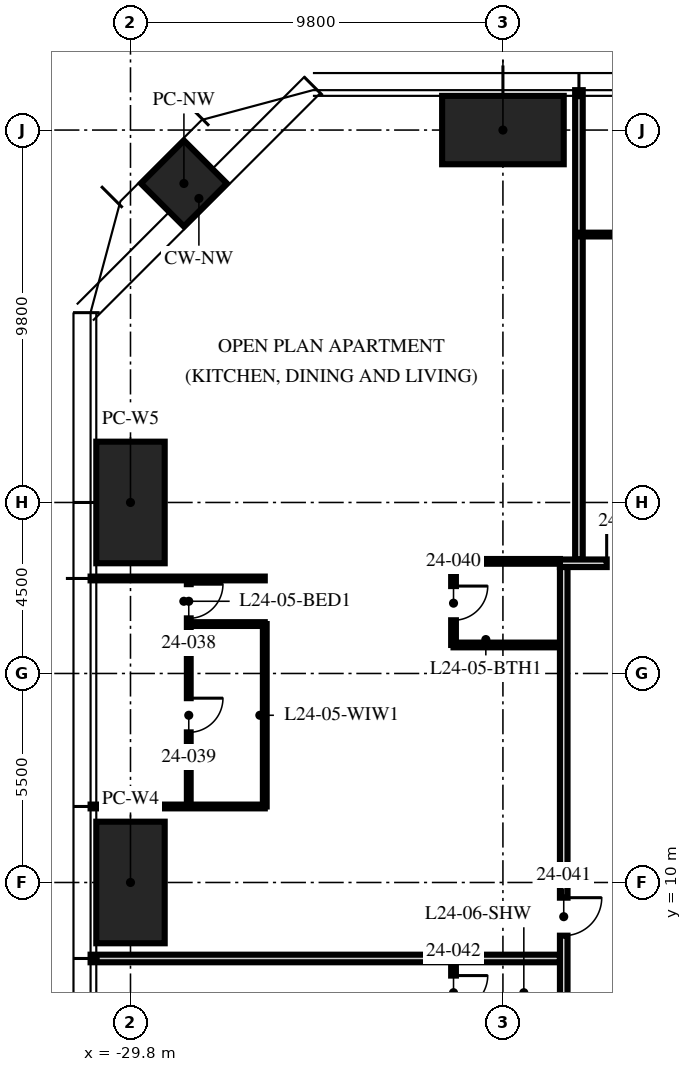
"""IFC4 building model, lengths in metres.
Left out: names, types, materials, properties, quantities, classifications, styles, units other than length and angle.
Written with IfcOpenShell. Run it as: python <this file> out.ifc"""

import sys

from ifc_helpers import new_model, si_unit, direction, frame, frame_2d, origin, origin_2d, place, context, subcontext, project, spatial, rectangle, hollow_rectangle, extrude, element, fill, save


model = new_model("IFC4")
c1 = context("Model", 3, precision=1e-05, world=origin(), true_north=direction((0.0, 1.0)))
c2 = subcontext(c1, "Body", "Model", "MODEL_VIEW")
j1 = project(units=[si_unit("LENGTHUNIT", "METRE"), si_unit("PLANEANGLEUNIT", "RADIAN")], contexts=[c1])
p1 = place(None, origin())
s1 = spatial("IfcSite", under=j1, at=p1, CompositionType="ELEMENT")
p2 = place(p1, origin())
s2 = spatial("IfcBuilding", under=s1, at=p2, CompositionType="ELEMENT")
p3 = place(p2, frame((0.0, 0.0, 96.0)))
s3 = spatial("IfcBuildingStorey", under=s2, at=p3, CompositionType="ELEMENT", Elevation=96.0)
p4 = place(p3, frame((-20.0, 29.8, 0.0), z_axis=(0.0, 0.0, 1.0), x_axis=(1.0, 0.0, 0.0)))
e1 = element("IfcColumn", 1, at=p4, inside=s3, PredefinedType="COLUMN", context=c2, shape_type="SweptSolid", body=[
    extrude(hollow_rectangle(XDim=3.2, YDim=1.8, WallThickness=0.2, at=origin_2d()), origin(), (0.0, 0.0, 1.0), 2.47),
])
p5 = place(p3, frame((-29.8, 10.0, 0.0), z_axis=(0.0, 0.0, 1.0), x_axis=(0.0, 1.0, 0.0)))
e2 = element("IfcColumn", 2, at=p5, inside=s3, PredefinedType="COLUMN", context=c2, shape_type="SweptSolid", body=[
    extrude(hollow_rectangle(XDim=3.2, YDim=1.8, WallThickness=0.2, at=origin_2d()), origin(), (0.0, 0.0, 1.0), 2.62),
])
p6 = place(p3, frame((-29.8, 20.0, 0.0), z_axis=(0.0, 0.0, 1.0), x_axis=(0.0, 1.0, 0.0)))
e3 = element("IfcColumn", 3, at=p6, inside=s3, PredefinedType="COLUMN", context=c2, shape_type="SweptSolid", body=[
    extrude(hollow_rectangle(XDim=3.2, YDim=1.8, WallThickness=0.2, at=origin_2d()), origin(), (0.0, 0.0, 1.0), 2.47),
])
p7 = place(p3, frame((-28.394, 28.394, 0.0), z_axis=(0.0, 0.0, 1.0), x_axis=(0.707106781187, 0.707106781187, 0.0)))
e4 = element("IfcColumn", 4, at=p7, inside=s3, PredefinedType="COLUMN", context=c2, shape_type="SweptSolid", body=[
    extrude(hollow_rectangle(XDim=1.6, YDim=1.6, WallThickness=0.1, at=origin_2d()), origin(), (0.0, 0.0, 1.0), 2.74),
])
p8 = place(p3, frame((-18.0, 18.5, 0.0), z_axis=(0.0, 0.0, 1.0), x_axis=(0.0, 1.0, 0.0)))
e5 = element("IfcWall", 5, at=p8, inside=s3, PredefinedType="PARTITIONING", context=c2, shape_type="SweptSolid", body=[
    extrude(rectangle(XDim=12.35, YDim=0.2, at=frame_2d((6.175, 0.0))), origin(), (0.0, 0.0, 1.0), 2.3),
])
for number, where, z_axis, x_axis in (
    (6, (-26.267, 18.0, 0.0), (0.0, 0.0, 1.0), (-1.0, 0.0, 0.0)),
    (7, (-26.267, 12.0, 0.0), (0.0, 0.0, 1.0), (-1.0, 0.0, 0.0)),
):
    element("IfcWall", number, at=place(p3, frame(where, z_axis=z_axis, x_axis=x_axis)), inside=s3, PredefinedType="PARTITIONING", context=c2, shape_type="SweptSolid", body=[
        extrude(rectangle(XDim=4.583, YDim=0.1, at=frame_2d((2.292, 0.0))), origin(), (0.0, 0.0, 1.0), 2.7),
    ])
p9 = place(p3, frame((-18.5, 8.0, 0.0), z_axis=(0.0, 0.0, 1.0), x_axis=(-1.0, 0.0, 0.0)))
e8 = element("IfcWall", 8, at=p9, inside=s3, PredefinedType="PARTITIONING", context=c2, shape_type="SweptSolid", body=[
    extrude(rectangle(XDim=12.35, YDim=0.2, at=frame_2d((6.175, 0.0))), origin(), (0.0, 0.0, 1.0), 2.7),
])
p10 = place(p3, frame((-12.0, 27.05, 0.0), z_axis=(0.0, 0.0, 1.0), x_axis=(-1.0, 0.0, 0.0)))
e9 = element("IfcWall", 9, at=p10, inside=s3, PredefinedType="PARTITIONING", context=c2, shape_type="SweptSolid", body=[
    extrude(rectangle(XDim=6.0, YDim=0.1, at=frame_2d((3.0, 0.0))), origin(), (0.0, 0.0, 1.0), 2.2),
])
p11 = place(p10, frame((2.55, 0.0, 0.0)))
e10 = element("IfcOpeningElement", 10, at=p11, cuts=e9, PredefinedType="OPENING", context=c2, shape_type="SweptSolid", body=[
    extrude(rectangle(XDim=0.9, YDim=2.1, at=frame_2d((0.45, 1.05))), frame((0.0, 0.06, 0.0), z_axis=(0.0, -1.0, 0.0), x_axis=(1.0, 0.0, 0.0)), (0.0, 0.0, 1.0), 0.12),
])
p12 = place(p3, frame((-28.267, 18.0, 0.0), z_axis=(0.0, 0.0, 1.0), x_axis=(0.0, -1.0, 0.0)))
e11 = element("IfcWall", 11, at=p12, inside=s3, PredefinedType="PARTITIONING", context=c2, shape_type="SweptSolid", body=[
    extrude(rectangle(XDim=6.0, YDim=0.1, at=frame_2d((3.0, 0.0))), origin(), (0.0, 0.0, 1.0), 2.2),
])
p13 = place(p12, frame((0.15, 0.0, 0.0)))
e12 = element("IfcOpeningElement", 12, at=p13, cuts=e11, PredefinedType="OPENING", context=c2, shape_type="SweptSolid", body=[
    extrude(rectangle(XDim=0.9, YDim=2.1, at=frame_2d((0.45, 1.05))), frame((0.0, 0.06, 0.0), z_axis=(0.0, -1.0, 0.0), x_axis=(1.0, 0.0, 0.0)), (0.0, 0.0, 1.0), 0.12),
])
p14 = place(p12, frame((3.15, 0.0, 0.0)))
e13 = element("IfcOpeningElement", 13, at=p14, cuts=e11, PredefinedType="OPENING", context=c2, shape_type="SweptSolid", body=[
    extrude(rectangle(XDim=0.9, YDim=2.1, at=frame_2d((0.45, 1.05))), frame((0.0, 0.06, 0.0), z_axis=(0.0, -1.0, 0.0), x_axis=(1.0, 0.0, 0.0)), (0.0, 0.0, 1.0), 0.12),
])
p15 = place(p3, frame((-26.267, 16.8, 0.0), z_axis=(0.0, 0.0, 1.0), x_axis=(-1.0, 0.0, 0.0)))
e14 = element("IfcWall", 14, at=p15, inside=s3, PredefinedType="PARTITIONING", context=c2, shape_type="SweptSolid", body=[
    extrude(rectangle(XDim=2.0, YDim=0.1, at=frame_2d((1.0, 0.0))), origin(), (0.0, 0.0, 1.0), 3.4),
])
p16 = place(p3, frame((-26.267, 16.8, 0.0), z_axis=(0.0, 0.0, 1.0), x_axis=(0.0, -1.0, 0.0)))
e15 = element("IfcWall", 15, at=p16, inside=s3, PredefinedType="PARTITIONING", context=c2, shape_type="SweptSolid", body=[
    extrude(rectangle(XDim=4.8, YDim=0.1, at=frame_2d((2.4, 0.0))), origin(), (0.0, 0.0, 1.0), 2.2),
])
p17 = place(p3, frame((-21.3, 18.45, 0.0), z_axis=(0.0, 0.0, 1.0), x_axis=(0.0, -1.0, 0.0)))
e16 = element("IfcWall", 16, at=p17, inside=s3, PredefinedType="PARTITIONING", context=c2, shape_type="SweptSolid", body=[
    extrude(rectangle(XDim=2.2, YDim=0.125, at=frame_2d((1.1, 0.0))), origin(), (0.0, 0.0, 1.0), 3.4),
])
p18 = place(p17, frame((0.65, 0.0, 0.0)))
e17 = element("IfcOpeningElement", 17, at=p18, cuts=e16, PredefinedType="OPENING", context=c2, shape_type="SweptSolid", body=[
    extrude(rectangle(XDim=0.9, YDim=2.1, at=frame_2d((0.45, 1.05))), frame((0.0, 0.073, 0.0), z_axis=(0.0, -1.0, 0.0), x_axis=(1.0, 0.0, 0.0)), (0.0, 0.0, 1.0), 0.145),
])
p19 = place(p3, frame((-18.5, 18.45, 0.0), z_axis=(0.0, 0.0, 1.0), x_axis=(-1.0, 0.0, 0.0)))
e18 = element("IfcWall", 18, at=p19, inside=s3, PredefinedType="PARTITIONING", context=c2, shape_type="SweptSolid", body=[
    extrude(rectangle(XDim=2.8, YDim=0.125, at=frame_2d((1.4, 0.0))), origin(), (0.0, 0.0, 1.0), 2.3),
])
p20 = place(p3, frame((-18.5, 16.25, 0.0), z_axis=(0.0, 0.0, 1.0), x_axis=(-1.0, 0.0, 0.0)))
e19 = element("IfcWall", 19, at=p20, inside=s3, PredefinedType="PARTITIONING", context=c2, shape_type="SweptSolid", body=[
    extrude(rectangle(XDim=2.8, YDim=0.125, at=frame_2d((1.4, 0.0))), origin(), (0.0, 0.0, 1.0), 3.4),
])
p21 = place(p3, frame((-21.3, 8.0, 0.0), z_axis=(0.0, 0.0, 1.0), x_axis=(0.0, -1.0, 0.0)))
e20 = element("IfcWall", 20, at=p21, inside=s3, PredefinedType="PARTITIONING", context=c2, shape_type="SweptSolid", body=[
    extrude(rectangle(XDim=1.8, YDim=0.125, at=frame_2d((0.9, 0.0))), origin(), (0.0, 0.0, 1.0), 3.4),
])
p22 = place(p21, frame((0.45, 0.0, 0.0)))
e21 = element("IfcOpeningElement", 21, at=p22, cuts=e20, PredefinedType="OPENING", context=c2, shape_type="SweptSolid", body=[
    extrude(rectangle(XDim=0.9, YDim=2.1, at=frame_2d((0.45, 1.05))), frame((0.0, 0.073, 0.0), z_axis=(0.0, -1.0, 0.0), x_axis=(1.0, 0.0, 0.0)), (0.0, 0.0, 1.0), 0.145),
])
p23 = place(p3, frame((-18.5, 18.4, 0.0), z_axis=(0.0, 0.0, 1.0), x_axis=(1.0, 0.0, 0.0)))
e22 = element("IfcWall", 22, at=p23, inside=s3, PredefinedType="PARTITIONING", context=c2, shape_type="SweptSolid", body=[
    extrude(rectangle(XDim=24.5, YDim=0.2, at=frame_2d((12.25, 0.0))), origin(), (0.0, 0.0, 1.0), 2.2),
])
p24 = place(p23, frame((1.23, 0.0, 0.0)))
e23 = element("IfcOpeningElement", 23, at=p24, cuts=e22, PredefinedType="OPENING", context=c2, shape_type="SweptSolid", body=[
    extrude(rectangle(XDim=1.0, YDim=2.2, at=frame_2d((0.5, 1.1))), frame((0.0, 0.11, 0.0), z_axis=(0.0, -1.0, 0.0), x_axis=(1.0, 0.0, 0.0)), (0.0, 0.0, 1.0), 0.22),
])
p25 = place(p3, frame((-18.4, 18.3, 0.0), z_axis=(0.0, 0.0, 1.0), x_axis=(0.0, -1.0, 0.0)))
e24 = element("IfcWall", 24, at=p25, inside=s3, PredefinedType="PARTITIONING", context=c2, shape_type="SweptSolid", body=[
    extrude(rectangle(XDim=14.3, YDim=0.2, at=frame_2d((7.15, 0.0))), origin(), (0.0, 0.0, 1.0), 2.2),
])
p26 = place(p25, frame((8.7, 0.0, 0.0)))
e25 = element("IfcOpeningElement", 25, at=p26, cuts=e24, PredefinedType="OPENING", context=c2, shape_type="SweptSolid", body=[
    extrude(rectangle(XDim=1.0, YDim=2.2, at=frame_2d((0.5, 1.1))), frame((0.0, 0.11, 0.0), z_axis=(0.0, -1.0, 0.0), x_axis=(1.0, 0.0, 0.0)), (0.0, 0.0, 1.0), 0.22),
])
p27 = place(p24, origin())
e26 = element("IfcDoor", 26, at=p27, inside=s3, OperationType="SINGLE_SWING_LEFT", PredefinedType="DOOR", context=c2, shape_type="SweptSolid", body=[
    extrude(rectangle(XDim=1.0, YDim=2.2, at=frame_2d((0.5, 1.1))), frame((0.0, 0.025, 0.0), z_axis=(0.0, -1.0, 0.0), x_axis=(1.0, 0.0, 0.0)), (0.0, 0.0, 1.0), 0.05),
])
fill(e23, e26)
p28 = place(p13, origin())
e27 = element("IfcDoor", 27, at=p28, inside=s3, OperationType="SINGLE_SWING_LEFT", PredefinedType="DOOR", context=c2, shape_type="SweptSolid", body=[
    extrude(rectangle(XDim=0.9, YDim=2.1, at=frame_2d((0.45, 1.05))), frame((0.0, 0.025, 0.0), z_axis=(0.0, -1.0, 0.0), x_axis=(1.0, 0.0, 0.0)), (0.0, 0.0, 1.0), 0.05),
])
fill(e12, e27)
p29 = place(p14, origin())
e28 = element("IfcDoor", 28, at=p29, inside=s3, OperationType="SINGLE_SWING_LEFT", PredefinedType="DOOR", context=c2, shape_type="SweptSolid", body=[
    extrude(rectangle(XDim=0.9, YDim=2.1, at=frame_2d((0.45, 1.05))), frame((0.0, 0.025, 0.0), z_axis=(0.0, -1.0, 0.0), x_axis=(1.0, 0.0, 0.0)), (0.0, 0.0, 1.0), 0.05),
])
fill(e13, e28)
p30 = place(p18, origin())
e29 = element("IfcDoor", 29, at=p30, inside=s3, OperationType="SINGLE_SWING_LEFT", PredefinedType="DOOR", context=c2, shape_type="SweptSolid", body=[
    extrude(rectangle(XDim=0.9, YDim=2.1, at=frame_2d((0.45, 1.05))), frame((0.0, 0.025, 0.0), z_axis=(0.0, -1.0, 0.0), x_axis=(1.0, 0.0, 0.0)), (0.0, 0.0, 1.0), 0.05),
])
fill(e17, e29)
p31 = place(p26, origin())
e30 = element("IfcDoor", 30, at=p31, inside=s3, OperationType="SINGLE_SWING_LEFT", PredefinedType="DOOR", context=c2, shape_type="SweptSolid", body=[
    extrude(rectangle(XDim=1.0, YDim=2.2, at=frame_2d((0.5, 1.1))), frame((0.0, 0.025, 0.0), z_axis=(0.0, -1.0, 0.0), x_axis=(1.0, 0.0, 0.0)), (0.0, 0.0, 1.0), 0.05),
])
fill(e25, e30)
p32 = place(p22, origin())
e31 = element("IfcDoor", 31, at=p32, inside=s3, OperationType="SINGLE_SWING_LEFT", PredefinedType="DOOR", context=c2, shape_type="SweptSolid", body=[
    extrude(rectangle(XDim=0.9, YDim=2.1, at=frame_2d((0.45, 1.05))), frame((0.0, 0.025, 0.0), z_axis=(0.0, -1.0, 0.0), x_axis=(1.0, 0.0, 0.0)), (0.0, 0.0, 1.0), 0.05),
])
fill(e21, e31)
save(model, sys.argv[1])
